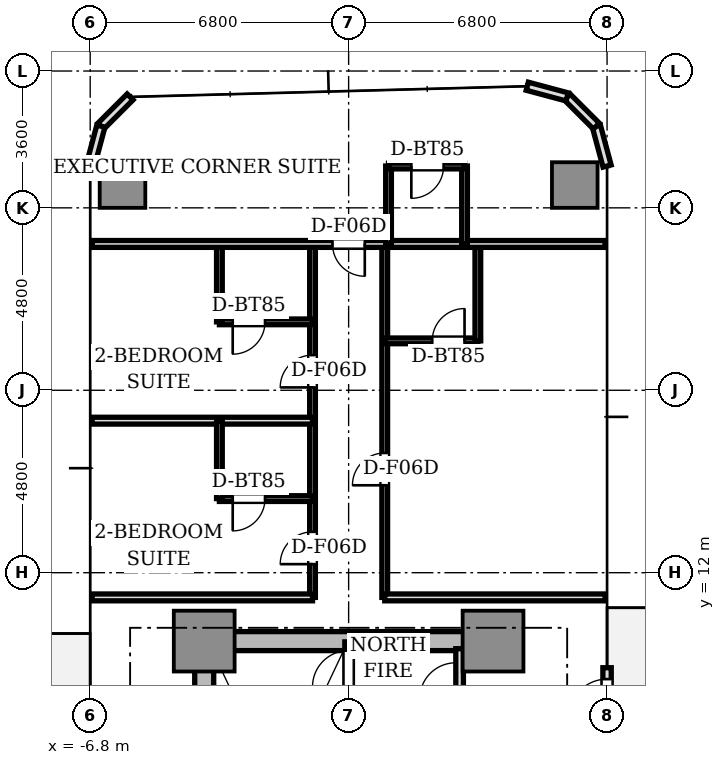
"""IFC4 building model, lengths in metres.
Left out: names, types, materials, properties, quantities, classifications, styles, units other than length and angle.
Written with IfcOpenShell. Run it as: python <this file> out.ifc"""

import sys

from ifc_helpers import new_model, si_unit, direction, frame, frame_2d, origin, origin_2d, place, context, subcontext, project, spatial, rectangle, extrude, source, transform, mapped, element, fill, save


model = new_model("IFC4")
c1 = context("Model", 3, precision=1e-05, world=origin(), true_north=direction((0.0, 1.0)))
c2 = subcontext(c1, "Body", "Model", "MODEL_VIEW")
j1 = project(units=[si_unit("LENGTHUNIT", "METRE"), si_unit("PLANEANGLEUNIT", "RADIAN")], contexts=[c1])
p1 = place(None, origin())
s1 = spatial("IfcSite", under=j1, at=p1, CompositionType="ELEMENT")
p2 = place(p1, origin())
s2 = spatial("IfcBuilding", under=s1, at=p2, CompositionType="ELEMENT")
p3 = place(p2, frame((0.0, 0.0, 29.8)))
s3 = spatial("IfcBuildingStorey", under=s2, at=p3, CompositionType="ELEMENT", Elevation=29.8)
p4 = place(p3, frame((-3.55, 10.2, 0.0), z_axis=(0.0, 0.0, 1.0), x_axis=(1.0, 0.0, 0.0)))
e1 = element("IfcWall", 1, at=p4, inside=s3, PredefinedType="SHEAR", context=c2, shape_type="SweptSolid", body=[
    extrude(rectangle(XDim=7.1, YDim=0.5, at=frame_2d((3.55, 0.0))), origin(), (0.0, 0.0, 1.0), 3.11),
])
p5 = place(p3, frame((-3.8, 2.85, 0.0), z_axis=(0.0, 0.0, 1.0), x_axis=(0.0, 1.0, 0.0)))
e2 = element("IfcWall", 2, at=p5, inside=s3, PredefinedType="SHEAR", context=c2, shape_type="SweptSolid", body=[
    extrude(rectangle(XDim=6.9, YDim=0.5, at=frame_2d((3.45, 0.0))), origin(), (0.0, 0.0, 1.0), 3.11),
])
m1 = source(origin(), c2, "Body", "SweptSolid", [
    extrude(rectangle(XDim=1.6, YDim=1.6, at=origin_2d()), origin(), (0.0, 0.0, 1.0), 3.11),
])
for number, where, z_axis, x_axis in (
    (3, (-3.8, 10.2, 0.0), (0.0, 0.0, 1.0), (1.0, 0.0, 0.0)),
    (4, (3.8, 10.2, 0.0), (0.0, 0.0, 1.0), (1.0, 0.0, 0.0)),
):
    element("IfcColumn", number, at=place(p3, frame(where, z_axis=z_axis, x_axis=x_axis)), inside=s3, PredefinedType="COLUMN", context=c2, shape_type="MappedRepresentation", body=[
        mapped(m1, transform((0.0, 0.0, 0.0), scale=1.0)),
    ])
m2 = source(origin(), c2, "Body", "SweptSolid", [
    extrude(rectangle(XDim=1.2, YDim=1.2, at=origin_2d()), origin(), (0.0, 0.0, 1.0), 3.11),
])
for number, where, z_axis, x_axis in (
    (5, (5.95, 22.2, 0.0), (0.0, 0.0, 1.0), (1.0, 0.0, 0.0)),
    (6, (-5.95, 22.2, 0.0), (0.0, 0.0, 1.0), (1.0, 0.0, 0.0)),
):
    element("IfcColumn", number, at=place(p3, frame(where, z_axis=z_axis, x_axis=x_axis)), inside=s3, PredefinedType="COLUMN", context=c2, shape_type="MappedRepresentation", body=[
        mapped(m2, transform((0.0, 0.0, 0.0), scale=1.0)),
    ])
p6 = place(p3, frame((6.8, 6.8, 0.0), z_axis=(0.0, 0.0, 1.0), x_axis=(0.0, 1.0, 0.0)))
e7 = element("IfcWall", 7, at=p6, inside=s3, PredefinedType="STANDARD", context=c2, shape_type="SweptSolid", body=[
    extrude(rectangle(XDim=2.7, YDim=0.22, at=frame_2d((1.35, 0.0))), origin(), (0.0, 0.0, 1.0), 3.11),
])
p7 = place(p6, frame((1.4, 0.0, 0.0)))
e8 = element("IfcOpeningElement", 8, at=p7, cuts=e7, PredefinedType="OPENING", context=c2, shape_type="SweptSolid", body=[
    extrude(rectangle(XDim=1.0, YDim=2.2, at=frame_2d((0.5, 1.1))), frame((0.0, 0.12, 0.0), z_axis=(0.0, -1.0, 0.0), x_axis=(1.0, 0.0, 0.0)), (0.0, 0.0, 1.0), 0.24),
])
for number, where, z_axis, x_axis in (
    (9, (6.8, 22.7, 0.0), (0.0, 0.0, 1.0), (-0.259, 0.966, 0.0)),
    (10, (6.519, 23.75, 0.0), (0.0, 0.0, 1.0), (-0.707, 0.707, 0.0)),
    (11, (5.75, 24.519, 0.0), (0.0, 0.0, 1.0), (-0.966, 0.259, 0.0)),
    (12, (-5.75, 24.519, 0.0), (0.0, 0.0, 1.0), (-0.707, -0.707, 0.0)),
    (13, (-6.519, 23.75, 0.0), (0.0, 0.0, 1.0), (-0.259, -0.966, 0.0)),
):
    element("IfcWall", number, at=place(p3, frame(where, z_axis=z_axis, x_axis=x_axis)), inside=s3, PredefinedType="STANDARD", context=c2, shape_type="SweptSolid", body=[
        extrude(rectangle(XDim=1.087, YDim=0.22, at=frame_2d((0.543, 0.0))), origin(), (0.0, 0.0, 1.0), 3.11),
    ])
p8 = place(p3, frame((0.0, 2.5, 0.0), z_axis=(0.0, 0.0, 1.0), x_axis=(0.0, 1.0, 0.0)))
e14 = element("IfcWall", 14, at=p8, inside=s3, PredefinedType="SOLIDWALL", context=c2, shape_type="SweptSolid", body=[
    extrude(rectangle(XDim=7.68, YDim=0.2, at=frame_2d((3.84, 0.0))), origin(), (0.0, 0.0, 1.0), 3.11),
])
p9 = place(p8, frame((6.5, 0.0, 0.0)))
e15 = element("IfcOpeningElement", 15, at=p9, cuts=e14, PredefinedType="OPENING", context=c2, shape_type="SweptSolid", body=[
    extrude(rectangle(XDim=0.95, YDim=2.15, at=frame_2d((0.475, 1.075))), frame((0.0, 0.11, 0.0), z_axis=(0.0, -1.0, 0.0), x_axis=(1.0, 0.0, 0.0)), (0.0, 0.0, 1.0), 0.22),
])
p10 = place(p3, frame((2.92, 8.68, 0.0), z_axis=(0.0, 0.0, 1.0), x_axis=(0.0, 1.0, 0.0)))
e16 = element("IfcWall", 16, at=p10, inside=s3, PredefinedType="SOLIDWALL", context=c2, shape_type="SweptSolid", body=[
    extrude(rectangle(XDim=1.32, YDim=0.2, at=frame_2d((0.66, 0.0))), origin(), (0.0, 0.0, 1.0), 2.66),
])
p11 = place(p3, frame((-0.95, 11.35, 0.0), z_axis=(0.0, 0.0, 1.0), x_axis=(0.0, 1.0, 0.0)))
e17 = element("IfcWall", 17, at=p11, inside=s3, PredefinedType="PARTITIONING", context=c2, shape_type="SweptSolid", body=[
    extrude(rectangle(XDim=9.3, YDim=0.15, at=frame_2d((4.65, 0.0))), origin(), (0.0, 0.0, 1.0), 2.66),
])
p12 = place(p11, frame((0.875, 0.0, 0.0)))
e18 = element("IfcOpeningElement", 18, at=p12, cuts=e17, PredefinedType="OPENING", context=c2, shape_type="SweptSolid", body=[
    extrude(rectangle(XDim=0.85, YDim=2.1, at=frame_2d((0.425, 1.05))), frame((0.0, 0.085, 0.0), z_axis=(0.0, -1.0, 0.0), x_axis=(1.0, 0.0, 0.0)), (0.0, 0.0, 1.0), 0.17),
])
p13 = place(p11, frame((5.525, 0.0, 0.0)))
e19 = element("IfcOpeningElement", 19, at=p13, cuts=e17, PredefinedType="OPENING", context=c2, shape_type="SweptSolid", body=[
    extrude(rectangle(XDim=0.85, YDim=2.1, at=frame_2d((0.425, 1.05))), frame((0.0, 0.085, 0.0), z_axis=(0.0, -1.0, 0.0), x_axis=(1.0, 0.0, 0.0)), (0.0, 0.0, 1.0), 0.17),
])
p14 = place(p3, frame((0.95, 11.35, 0.0), z_axis=(0.0, 0.0, 1.0), x_axis=(0.0, 1.0, 0.0)))
e20 = element("IfcWall", 20, at=p14, inside=s3, PredefinedType="PARTITIONING", context=c2, shape_type="SweptSolid", body=[
    extrude(rectangle(XDim=9.3, YDim=0.15, at=frame_2d((4.65, 0.0))), origin(), (0.0, 0.0, 1.0), 2.66),
])
p15 = place(p14, frame((2.95, 0.0, 0.0)))
e21 = element("IfcOpeningElement", 21, at=p15, cuts=e20, PredefinedType="OPENING", context=c2, shape_type="SweptSolid", body=[
    extrude(rectangle(XDim=0.85, YDim=2.1, at=frame_2d((0.425, 1.05))), frame((0.0, 0.085, 0.0), z_axis=(0.0, -1.0, 0.0), x_axis=(1.0, 0.0, 0.0)), (0.0, 0.0, 1.0), 0.17),
])
for number, where, z_axis, x_axis in (
    (22, (-0.95, 11.35, 0.0), (0.0, 0.0, 1.0), (-1.0, 0.0, 0.0)),
    (23, (6.75, 11.35, 0.0), (0.0, 0.0, 1.0), (-1.0, 0.0, 0.0)),
    (24, (-0.95, 16.0, 0.0), (0.0, 0.0, 1.0), (-1.0, 0.0, 0.0)),
):
    element("IfcWall", number, at=place(p3, frame(where, z_axis=z_axis, x_axis=x_axis)), inside=s3, PredefinedType="PARTITIONING", context=c2, shape_type="SweptSolid", body=[
        extrude(rectangle(XDim=5.8, YDim=0.18, at=frame_2d((2.9, 0.0))), origin(), (0.0, 0.0, 1.0), 2.66),
    ])
p16 = place(p3, frame((-0.95, 13.95, 0.0), z_axis=(0.0, 0.0, 1.0), x_axis=(-1.0, 0.0, 0.0)))
e25 = element("IfcWall", 25, at=p16, inside=s3, PredefinedType="PARTITIONING", context=c2, shape_type="SweptSolid", body=[
    extrude(rectangle(XDim=2.45, YDim=0.15, at=frame_2d((1.225, 0.0))), origin(), (0.0, 0.0, 1.0), 2.66),
])
p17 = place(p16, frame((1.25, 0.0, 0.0)))
e26 = element("IfcOpeningElement", 26, at=p17, cuts=e25, PredefinedType="OPENING", context=c2, shape_type="SweptSolid", body=[
    extrude(rectangle(XDim=0.85, YDim=2.1, at=frame_2d((0.425, 1.05))), frame((0.0, 0.085, 0.0), z_axis=(0.0, -1.0, 0.0), x_axis=(1.0, 0.0, 0.0)), (0.0, 0.0, 1.0), 0.17),
])
p18 = place(p3, frame((-3.4, 13.95, 0.0), z_axis=(0.0, 0.0, 1.0), x_axis=(0.0, 1.0, 0.0)))
e27 = element("IfcWall", 27, at=p18, inside=s3, PredefinedType="PARTITIONING", context=c2, shape_type="SweptSolid", body=[
    extrude(rectangle(XDim=2.05, YDim=0.15, at=frame_2d((1.025, 0.0))), origin(), (0.0, 0.0, 1.0), 2.66),
])
p19 = place(p3, frame((-0.95, 18.6, 0.0), z_axis=(0.0, 0.0, 1.0), x_axis=(-1.0, 0.0, 0.0)))
e28 = element("IfcWall", 28, at=p19, inside=s3, PredefinedType="PARTITIONING", context=c2, shape_type="SweptSolid", body=[
    extrude(rectangle(XDim=2.45, YDim=0.15, at=frame_2d((1.225, 0.0))), origin(), (0.0, 0.0, 1.0), 2.66),
])
p20 = place(p19, frame((1.25, 0.0, 0.0)))
e29 = element("IfcOpeningElement", 29, at=p20, cuts=e28, PredefinedType="OPENING", context=c2, shape_type="SweptSolid", body=[
    extrude(rectangle(XDim=0.85, YDim=2.1, at=frame_2d((0.425, 1.05))), frame((0.0, 0.085, 0.0), z_axis=(0.0, -1.0, 0.0), x_axis=(1.0, 0.0, 0.0)), (0.0, 0.0, 1.0), 0.17),
])
p21 = place(p3, frame((-3.4, 18.6, 0.0), z_axis=(0.0, 0.0, 1.0), x_axis=(0.0, 1.0, 0.0)))
e30 = element("IfcWall", 30, at=p21, inside=s3, PredefinedType="PARTITIONING", context=c2, shape_type="SweptSolid", body=[
    extrude(rectangle(XDim=2.05, YDim=0.15, at=frame_2d((1.025, 0.0))), origin(), (0.0, 0.0, 1.0), 2.66),
])
p22 = place(p3, frame((0.95, 18.1, 0.0), z_axis=(0.0, 0.0, 1.0), x_axis=(1.0, 0.0, 0.0)))
e31 = element("IfcWall", 31, at=p22, inside=s3, PredefinedType="PARTITIONING", context=c2, shape_type="SweptSolid", body=[
    extrude(rectangle(XDim=2.45, YDim=0.15, at=frame_2d((1.225, 0.0))), origin(), (0.0, 0.0, 1.0), 2.66),
])
p23 = place(p22, frame((1.25, 0.0, 0.0)))
e32 = element("IfcOpeningElement", 32, at=p23, cuts=e31, PredefinedType="OPENING", context=c2, shape_type="SweptSolid", body=[
    extrude(rectangle(XDim=0.85, YDim=2.1, at=frame_2d((0.425, 1.05))), frame((0.0, 0.085, 0.0), z_axis=(0.0, -1.0, 0.0), x_axis=(1.0, 0.0, 0.0)), (0.0, 0.0, 1.0), 0.17),
])
p24 = place(p3, frame((3.4, 18.1, 0.0), z_axis=(0.0, 0.0, 1.0), x_axis=(0.0, 1.0, 0.0)))
e33 = element("IfcWall", 33, at=p24, inside=s3, PredefinedType="PARTITIONING", context=c2, shape_type="SweptSolid", body=[
    extrude(rectangle(XDim=2.55, YDim=0.15, at=frame_2d((1.275, 0.0))), origin(), (0.0, 0.0, 1.0), 2.66),
])
p25 = place(p3, frame((6.75, 20.65, 0.0), z_axis=(0.0, 0.0, 1.0), x_axis=(-1.0, 0.0, 0.0)))
e34 = element("IfcWall", 34, at=p25, inside=s3, PredefinedType="PARTITIONING", context=c2, shape_type="SweptSolid", body=[
    extrude(rectangle(XDim=13.5, YDim=0.18, at=frame_2d((6.75, 0.0))), origin(), (0.0, 0.0, 1.0), 2.66),
])
p26 = place(p25, frame((6.325, 0.0, 0.0)))
e35 = element("IfcOpeningElement", 35, at=p26, cuts=e34, PredefinedType="OPENING", context=c2, shape_type="SweptSolid", body=[
    extrude(rectangle(XDim=0.85, YDim=2.1, at=frame_2d((0.425, 1.05))), frame((0.0, 0.1, 0.0), z_axis=(0.0, -1.0, 0.0), x_axis=(1.0, 0.0, 0.0)), (0.0, 0.0, 1.0), 0.2),
])
for number, where, z_axis, x_axis in (
    (36, (1.05, 20.65, 0.0), (0.0, 0.0, 1.0), (0.0, 1.0, 0.0)),
    (37, (3.05, 20.65, 0.0), (0.0, 0.0, 1.0), (0.0, 1.0, 0.0)),
):
    element("IfcWall", number, at=place(p3, frame(where, z_axis=z_axis, x_axis=x_axis)), inside=s3, PredefinedType="PARTITIONING", context=c2, shape_type="SweptSolid", body=[
        extrude(rectangle(XDim=2.05, YDim=0.15, at=frame_2d((1.025, 0.0))), origin(), (0.0, 0.0, 1.0), 2.66),
    ])
p27 = place(p3, frame((3.05, 22.7, 0.0), z_axis=(0.0, 0.0, 1.0), x_axis=(-1.0, 0.0, 0.0)))
e38 = element("IfcWall", 38, at=p27, inside=s3, PredefinedType="PARTITIONING", context=c2, shape_type="SweptSolid", body=[
    extrude(rectangle(XDim=2.0, YDim=0.15, at=frame_2d((1.0, 0.0))), origin(), (0.0, 0.0, 1.0), 2.66),
])
p28 = place(p27, frame((0.55, 0.0, 0.0)))
e39 = element("IfcOpeningElement", 39, at=p28, cuts=e38, PredefinedType="OPENING", context=c2, shape_type="SweptSolid", body=[
    extrude(rectangle(XDim=0.85, YDim=2.1, at=frame_2d((0.425, 1.05))), frame((0.0, 0.085, 0.0), z_axis=(0.0, -1.0, 0.0), x_axis=(1.0, 0.0, 0.0)), (0.0, 0.0, 1.0), 0.17),
])
m3 = source(origin(), c2, "Body", "SweptSolid", [
    extrude(rectangle(XDim=1.0, YDim=0.05, at=origin_2d()), origin(), (0.0, 0.0, 1.0), 2.2),
])
p29 = place(p7, frame((0.5, 0.0, 0.0)))
e40 = element("IfcDoor", 40, at=p29, inside=s3, OperationType="SINGLE_SWING_LEFT", PredefinedType="DOOR", context=c2, shape_type="MappedRepresentation", body=[
    mapped(m3, transform((0.0, 0.0, 0.0), scale=1.0)),
])
fill(e8, e40)
m4 = source(origin(), c2, "Body", "SweptSolid", [
    extrude(rectangle(XDim=0.95, YDim=0.05, at=origin_2d()), origin(), (0.0, 0.0, 1.0), 2.15),
])
p30 = place(p9, frame((0.475, 0.0, 0.0)))
e41 = element("IfcDoor", 41, at=p30, inside=s3, OperationType="SINGLE_SWING_LEFT", PredefinedType="DOOR", context=c2, shape_type="MappedRepresentation", body=[
    mapped(m4, transform((0.0, 0.0, 0.0), scale=1.0)),
])
fill(e15, e41)
m5 = source(origin(), c2, "Body", "SweptSolid", [
    extrude(rectangle(XDim=0.85, YDim=0.05, at=origin_2d()), origin(), (0.0, 0.0, 1.0), 2.1),
])
p31 = place(p17, frame((0.425, 0.0, 0.0)))
e42 = element("IfcDoor", 42, at=p31, inside=s3, OperationType="SINGLE_SWING_RIGHT", PredefinedType="DOOR", context=c2, shape_type="MappedRepresentation", body=[
    mapped(m5, transform((0.0, 0.0, 0.0), scale=1.0)),
])
fill(e26, e42)
p32 = place(p12, frame((0.425, 0.0, 0.0)))
e43 = element("IfcDoor", 43, at=p32, inside=s3, OperationType="SINGLE_SWING_LEFT", PredefinedType="DOOR", context=c2, shape_type="MappedRepresentation", body=[
    mapped(m5, transform((0.0, 0.0, 0.0), scale=1.0)),
])
fill(e18, e43)
p33 = place(p20, frame((0.425, 0.0, 0.0)))
e44 = element("IfcDoor", 44, at=p33, inside=s3, OperationType="SINGLE_SWING_RIGHT", PredefinedType="DOOR", context=c2, shape_type="MappedRepresentation", body=[
    mapped(m5, transform((0.0, 0.0, 0.0), scale=1.0)),
])
fill(e29, e44)
p34 = place(p13, frame((0.425, 0.0, 0.0)))
e45 = element("IfcDoor", 45, at=p34, inside=s3, OperationType="SINGLE_SWING_LEFT", PredefinedType="DOOR", context=c2, shape_type="MappedRepresentation", body=[
    mapped(m5, transform((0.0, 0.0, 0.0), scale=1.0)),
])
fill(e19, e45)
p35 = place(p23, frame((0.425, 0.0, 0.0)))
e46 = element("IfcDoor", 46, at=p35, inside=s3, OperationType="SINGLE_SWING_RIGHT", PredefinedType="DOOR", context=c2, shape_type="MappedRepresentation", body=[
    mapped(m5, transform((0.0, 0.0, 0.0), scale=1.0)),
])
fill(e32, e46)
p36 = place(p15, frame((0.425, 0.0, 0.0)))
e47 = element("IfcDoor", 47, at=p36, inside=s3, OperationType="SINGLE_SWING_LEFT", PredefinedType="DOOR", context=c2, shape_type="MappedRepresentation", body=[
    mapped(m5, transform((0.0, 0.0, 0.0), scale=1.0)),
])
fill(e21, e47)
p37 = place(p28, frame((0.425, 0.0, 0.0)))
e48 = element("IfcDoor", 48, at=p37, inside=s3, OperationType="SINGLE_SWING_RIGHT", PredefinedType="DOOR", context=c2, shape_type="MappedRepresentation", body=[
    mapped(m5, transform((0.0, 0.0, 0.0), scale=1.0)),
])
fill(e39, e48)
p38 = place(p26, frame((0.425, 0.0, 0.0)))
e49 = element("IfcDoor", 49, at=p38, inside=s3, OperationType="SINGLE_SWING_LEFT", PredefinedType="DOOR", context=c2, shape_type="MappedRepresentation", body=[
    mapped(m5, transform((0.0, 0.0, 0.0), scale=1.0)),
])
fill(e35, e49)
save(model, sys.argv[1])
